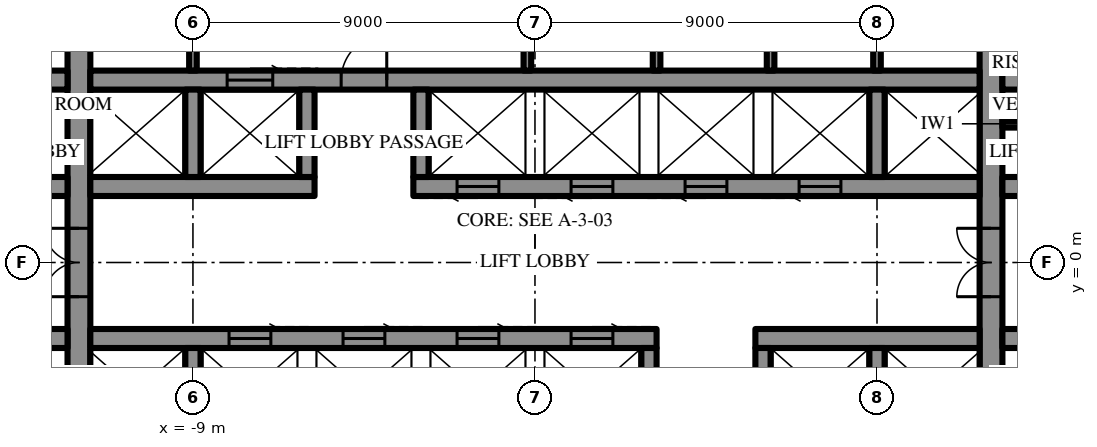
"""IFC4 building model, lengths in metres.
Left out: names, types, materials, properties, quantities, classifications, styles, units other than length and angle.
Written with IfcOpenShell. Run it as: python <this file> out.ifc"""

import sys

from ifc_helpers import new_model, si_unit, direction, frame, frame_2d, origin, place, context, subcontext, project, spatial, rectangle, extrude, element, fill, save


model = new_model("IFC4")
c1 = context("Model", 3, precision=1e-05, world=origin(), true_north=direction((0.0, 1.0)))
c2 = subcontext(c1, "Body", "Model", "MODEL_VIEW")
j1 = project(units=[si_unit("LENGTHUNIT", "METRE"), si_unit("PLANEANGLEUNIT", "RADIAN")], contexts=[c1])
p1 = place(None, origin())
s1 = spatial("IfcSite", under=j1, at=p1, CompositionType="ELEMENT")
p2 = place(p1, origin())
s2 = spatial("IfcBuilding", under=s1, at=p2, CompositionType="ELEMENT")
p3 = place(p2, frame((0.0, 0.0, 223.9)))
s3 = spatial("IfcBuildingStorey", under=s2, at=p3, CompositionType="ELEMENT", Elevation=223.9)
p4 = place(p3, frame((12.0, -10.7, 0.0), z_axis=(0.0, 0.0, 1.0), x_axis=(0.0, 1.0, 0.0)))
e1 = element("IfcWall", 1, at=p4, inside=s3, PredefinedType="SHEAR", context=c2, shape_type="SweptSolid", body=[
    extrude(rectangle(XDim=21.4, YDim=0.6, at=frame_2d((10.7, 0.0))), origin(), (0.0, 0.0, 1.0), 4.2),
])
p5 = place(p4, frame((9.8, 0.0, 0.0)))
e2 = element("IfcOpeningElement", 2, at=p5, cuts=e1, PredefinedType="OPENING", context=c2, shape_type="SweptSolid", body=[
    extrude(rectangle(XDim=1.8, YDim=2.4, at=frame_2d((0.9, 1.2))), frame((0.0, 0.31, 0.0), z_axis=(0.0, -1.0, 0.0), x_axis=(1.0, 0.0, 0.0)), (0.0, 0.0, 1.0), 0.62),
])
p6 = place(p3, frame((-12.0, -10.7, 0.0), z_axis=(0.0, 0.0, 1.0), x_axis=(0.0, 1.0, 0.0)))
e3 = element("IfcWall", 3, at=p6, inside=s3, PredefinedType="SHEAR", context=c2, shape_type="SweptSolid", body=[
    extrude(rectangle(XDim=21.4, YDim=0.6, at=frame_2d((10.7, 0.0))), origin(), (0.0, 0.0, 1.0), 4.2),
])
p7 = place(p6, frame((9.8, 0.0, 0.0)))
e4 = element("IfcOpeningElement", 4, at=p7, cuts=e3, PredefinedType="OPENING", context=c2, shape_type="SweptSolid", body=[
    extrude(rectangle(XDim=1.8, YDim=2.4, at=frame_2d((0.9, 1.2))), frame((0.0, 0.31, 0.0), z_axis=(0.0, -1.0, 0.0), x_axis=(1.0, 0.0, 0.0)), (0.0, 0.0, 1.0), 0.62),
])
p8 = place(p3, frame((-14.5, 2.0, 0.0), z_axis=(0.0, 0.0, 1.0), x_axis=(1.0, 0.0, 0.0)))
e5 = element("IfcWall", 5, at=p8, inside=s3, PredefinedType="SHEAR", context=c2, shape_type="SweptSolid", body=[
    extrude(rectangle(XDim=2.2, YDim=0.5, at=frame_2d((1.1, 0.0))), origin(), (0.0, 0.0, 1.0), 4.2),
])
p9 = place(p8, frame((0.5, 0.0, 0.0)))
e6 = element("IfcOpeningElement", 6, at=p9, cuts=e5, PredefinedType="OPENING", context=c2, shape_type="SweptSolid", body=[
    extrude(rectangle(XDim=0.9, YDim=2.2, at=frame_2d((0.45, 1.1))), frame((0.0, 0.26, 0.0), z_axis=(0.0, -1.0, 0.0), x_axis=(1.0, 0.0, 0.0)), (0.0, 0.0, 1.0), 0.52),
])
p10 = place(p3, frame((-11.7, 2.0, 0.0), z_axis=(0.0, 0.0, 1.0), x_axis=(1.0, 0.0, 0.0)))
e7 = element("IfcWall", 7, at=p10, inside=s3, PredefinedType="SHEAR", context=c2, shape_type="SweptSolid", body=[
    extrude(rectangle(XDim=5.9, YDim=0.5, at=frame_2d((2.95, 0.0))), origin(), (0.0, 0.0, 1.0), 4.2),
])
p11 = place(p3, frame((-3.2, 2.0, 0.0), z_axis=(0.0, 0.0, 1.0), x_axis=(1.0, 0.0, 0.0)))
e8 = element("IfcWall", 8, at=p11, inside=s3, PredefinedType="SHEAR", context=c2, shape_type="SweptSolid", body=[
    extrude(rectangle(XDim=14.9, YDim=0.5, at=frame_2d((7.45, 0.0))), origin(), (0.0, 0.0, 1.0), 4.2),
])
p12 = place(p11, frame((1.15, 0.0, 0.0)))
e9 = element("IfcOpeningElement", 9, at=p12, cuts=e8, PredefinedType="OPENING", context=c2, shape_type="SweptSolid", body=[
    extrude(rectangle(XDim=1.1, YDim=2.2, at=frame_2d((0.55, 1.1))), frame((0.0, 0.26, 0.0), z_axis=(0.0, -1.0, 0.0), x_axis=(1.0, 0.0, 0.0)), (0.0, 0.0, 1.0), 0.52),
])
p13 = place(p11, frame((4.15, 0.0, 0.0)))
e10 = element("IfcOpeningElement", 10, at=p13, cuts=e8, PredefinedType="OPENING", context=c2, shape_type="SweptSolid", body=[
    extrude(rectangle(XDim=1.1, YDim=2.2, at=frame_2d((0.55, 1.1))), frame((0.0, 0.26, 0.0), z_axis=(0.0, -1.0, 0.0), x_axis=(1.0, 0.0, 0.0)), (0.0, 0.0, 1.0), 0.52),
])
p14 = place(p11, frame((7.15, 0.0, 0.0)))
e11 = element("IfcOpeningElement", 11, at=p14, cuts=e8, PredefinedType="OPENING", context=c2, shape_type="SweptSolid", body=[
    extrude(rectangle(XDim=1.1, YDim=2.2, at=frame_2d((0.55, 1.1))), frame((0.0, 0.26, 0.0), z_axis=(0.0, -1.0, 0.0), x_axis=(1.0, 0.0, 0.0)), (0.0, 0.0, 1.0), 0.52),
])
p15 = place(p11, frame((10.15, 0.0, 0.0)))
e12 = element("IfcOpeningElement", 12, at=p15, cuts=e8, PredefinedType="OPENING", context=c2, shape_type="SweptSolid", body=[
    extrude(rectangle(XDim=1.1, YDim=2.2, at=frame_2d((0.55, 1.1))), frame((0.0, 0.26, 0.0), z_axis=(0.0, -1.0, 0.0), x_axis=(1.0, 0.0, 0.0)), (0.0, 0.0, 1.0), 0.52),
])
p16 = place(p3, frame((12.3, 2.0, 0.0), z_axis=(0.0, 0.0, 1.0), x_axis=(1.0, 0.0, 0.0)))
e13 = element("IfcWall", 13, at=p16, inside=s3, PredefinedType="SHEAR", context=c2, shape_type="SweptSolid", body=[
    extrude(rectangle(XDim=2.2, YDim=0.5, at=frame_2d((1.1, 0.0))), origin(), (0.0, 0.0, 1.0), 4.2),
])
p17 = place(p16, frame((0.8, 0.0, 0.0)))
e14 = element("IfcOpeningElement", 14, at=p17, cuts=e13, PredefinedType="OPENING", context=c2, shape_type="SweptSolid", body=[
    extrude(rectangle(XDim=0.9, YDim=2.2, at=frame_2d((0.45, 1.1))), frame((0.0, 0.26, 0.0), z_axis=(0.0, -1.0, 0.0), x_axis=(1.0, 0.0, 0.0)), (0.0, 0.0, 1.0), 0.52),
])
p18 = place(p3, frame((-14.5, 4.8, 0.0), z_axis=(0.0, 0.0, 1.0), x_axis=(1.0, 0.0, 0.0)))
e15 = element("IfcWall", 15, at=p18, inside=s3, PredefinedType="SHEAR", context=c2, shape_type="SweptSolid", body=[
    extrude(rectangle(XDim=2.2, YDim=0.5, at=frame_2d((1.1, 0.0))), origin(), (0.0, 0.0, 1.0), 4.2),
])
p19 = place(p3, frame((-11.7, 4.8, 0.0), z_axis=(0.0, 0.0, 1.0), x_axis=(1.0, 0.0, 0.0)))
e16 = element("IfcWall", 16, at=p19, inside=s3, PredefinedType="SHEAR", context=c2, shape_type="SweptSolid", body=[
    extrude(rectangle(XDim=23.4, YDim=0.5, at=frame_2d((11.7, 0.0))), origin(), (0.0, 0.0, 1.0), 4.2),
])
p20 = place(p19, frame((6.6, 0.0, 0.0)))
e17 = element("IfcOpeningElement", 17, at=p20, cuts=e16, PredefinedType="OPENING", context=c2, shape_type="SweptSolid", body=[
    extrude(rectangle(XDim=1.2, YDim=2.2, at=frame_2d((0.6, 1.1))), frame((0.0, 0.26, 0.0), z_axis=(0.0, -1.0, 0.0), x_axis=(1.0, 0.0, 0.0)), (0.0, 0.0, 1.0), 0.52),
])
p21 = place(p19, frame((3.6, 0.0, 0.0)))
e18 = element("IfcOpeningElement", 18, at=p21, cuts=e16, PredefinedType="OPENING", context=c2, shape_type="SweptSolid", body=[
    extrude(rectangle(XDim=1.2, YDim=2.2, at=frame_2d((0.6, 1.1))), frame((0.0, 0.26, 0.0), z_axis=(0.0, -1.0, 0.0), x_axis=(1.0, 0.0, 0.0)), (0.0, 0.0, 1.0), 0.52),
])
p22 = place(p3, frame((12.3, 4.8, 0.0), z_axis=(0.0, 0.0, 1.0), x_axis=(1.0, 0.0, 0.0)))
e19 = element("IfcWall", 19, at=p22, inside=s3, PredefinedType="SHEAR", context=c2, shape_type="SweptSolid", body=[
    extrude(rectangle(XDim=2.2, YDim=0.5, at=frame_2d((1.1, 0.0))), origin(), (0.0, 0.0, 1.0), 4.2),
])
for number, where, z_axis, x_axis in (
    (20, (-9.0, 2.25, 0.0), (0.0, 0.0, 1.0), (0.0, 1.0, 0.0)),
    (21, (-6.0, 2.25, 0.0), (0.0, 0.0, 1.0), (0.0, 1.0, 0.0)),
    (22, (-3.0, 2.25, 0.0), (0.0, 0.0, 1.0), (0.0, 1.0, 0.0)),
    (23, (9.0, 2.25, 0.0), (0.0, 0.0, 1.0), (0.0, 1.0, 0.0)),
):
    element("IfcWall", number, at=place(p3, frame(where, z_axis=z_axis, x_axis=x_axis)), inside=s3, PredefinedType="SHEAR", context=c2, shape_type="SweptSolid", body=[
        extrude(rectangle(XDim=2.3, YDim=0.4, at=frame_2d((1.15, 0.0))), origin(), (0.0, 0.0, 1.0), 4.2),
    ])
p23 = place(p3, frame((-0.2, 5.05, 0.0), z_axis=(0.0, 0.0, 1.0), x_axis=(0.0, 1.0, 0.0)))
e24 = element("IfcWall", 24, at=p23, inside=s3, PredefinedType="SHEAR", context=c2, shape_type="SweptSolid", body=[
    extrude(rectangle(XDim=5.65, YDim=0.2, at=frame_2d((2.825, 0.0))), origin(), (0.0, 0.0, 1.0), 4.2),
])
p24 = place(p3, frame((14.5, -2.0, 0.0), z_axis=(0.0, 0.0, 1.0), x_axis=(-1.0, 0.0, 0.0)))
e25 = element("IfcWall", 25, at=p24, inside=s3, PredefinedType="SHEAR", context=c2, shape_type="SweptSolid", body=[
    extrude(rectangle(XDim=2.2, YDim=0.5, at=frame_2d((1.1, 0.0))), origin(), (0.0, 0.0, 1.0), 4.2),
])
p25 = place(p24, frame((0.5, 0.0, 0.0)))
e26 = element("IfcOpeningElement", 26, at=p25, cuts=e25, PredefinedType="OPENING", context=c2, shape_type="SweptSolid", body=[
    extrude(rectangle(XDim=0.9, YDim=2.2, at=frame_2d((0.45, 1.1))), frame((0.0, 0.26, 0.0), z_axis=(0.0, -1.0, 0.0), x_axis=(1.0, 0.0, 0.0)), (0.0, 0.0, 1.0), 0.52),
])
p26 = place(p3, frame((11.7, -2.0, 0.0), z_axis=(0.0, 0.0, 1.0), x_axis=(-1.0, 0.0, 0.0)))
e27 = element("IfcWall", 27, at=p26, inside=s3, PredefinedType="SHEAR", context=c2, shape_type="SweptSolid", body=[
    extrude(rectangle(XDim=5.9, YDim=0.5, at=frame_2d((2.95, 0.0))), origin(), (0.0, 0.0, 1.0), 4.2),
])
p27 = place(p3, frame((3.2, -2.0, 0.0), z_axis=(0.0, 0.0, 1.0), x_axis=(-1.0, 0.0, 0.0)))
e28 = element("IfcWall", 28, at=p27, inside=s3, PredefinedType="SHEAR", context=c2, shape_type="SweptSolid", body=[
    extrude(rectangle(XDim=14.9, YDim=0.5, at=frame_2d((7.45, 0.0))), origin(), (0.0, 0.0, 1.0), 4.2),
])
p28 = place(p27, frame((1.15, 0.0, 0.0)))
e29 = element("IfcOpeningElement", 29, at=p28, cuts=e28, PredefinedType="OPENING", context=c2, shape_type="SweptSolid", body=[
    extrude(rectangle(XDim=1.1, YDim=2.2, at=frame_2d((0.55, 1.1))), frame((0.0, 0.26, 0.0), z_axis=(0.0, -1.0, 0.0), x_axis=(1.0, 0.0, 0.0)), (0.0, 0.0, 1.0), 0.52),
])
p29 = place(p27, frame((4.15, 0.0, 0.0)))
e30 = element("IfcOpeningElement", 30, at=p29, cuts=e28, PredefinedType="OPENING", context=c2, shape_type="SweptSolid", body=[
    extrude(rectangle(XDim=1.1, YDim=2.2, at=frame_2d((0.55, 1.1))), frame((0.0, 0.26, 0.0), z_axis=(0.0, -1.0, 0.0), x_axis=(1.0, 0.0, 0.0)), (0.0, 0.0, 1.0), 0.52),
])
p30 = place(p27, frame((7.15, 0.0, 0.0)))
e31 = element("IfcOpeningElement", 31, at=p30, cuts=e28, PredefinedType="OPENING", context=c2, shape_type="SweptSolid", body=[
    extrude(rectangle(XDim=1.1, YDim=2.2, at=frame_2d((0.55, 1.1))), frame((0.0, 0.26, 0.0), z_axis=(0.0, -1.0, 0.0), x_axis=(1.0, 0.0, 0.0)), (0.0, 0.0, 1.0), 0.52),
])
p31 = place(p27, frame((10.15, 0.0, 0.0)))
e32 = element("IfcOpeningElement", 32, at=p31, cuts=e28, PredefinedType="OPENING", context=c2, shape_type="SweptSolid", body=[
    extrude(rectangle(XDim=1.1, YDim=2.2, at=frame_2d((0.55, 1.1))), frame((0.0, 0.26, 0.0), z_axis=(0.0, -1.0, 0.0), x_axis=(1.0, 0.0, 0.0)), (0.0, 0.0, 1.0), 0.52),
])
p32 = place(p3, frame((-12.3, -2.0, 0.0), z_axis=(0.0, 0.0, 1.0), x_axis=(-1.0, 0.0, 0.0)))
e33 = element("IfcWall", 33, at=p32, inside=s3, PredefinedType="SHEAR", context=c2, shape_type="SweptSolid", body=[
    extrude(rectangle(XDim=2.2, YDim=0.5, at=frame_2d((1.1, 0.0))), origin(), (0.0, 0.0, 1.0), 4.2),
])
p33 = place(p32, frame((0.8, 0.0, 0.0)))
e34 = element("IfcOpeningElement", 34, at=p33, cuts=e33, PredefinedType="OPENING", context=c2, shape_type="SweptSolid", body=[
    extrude(rectangle(XDim=0.9, YDim=2.2, at=frame_2d((0.45, 1.1))), frame((0.0, 0.26, 0.0), z_axis=(0.0, -1.0, 0.0), x_axis=(1.0, 0.0, 0.0)), (0.0, 0.0, 1.0), 0.52),
])
for number, where, z_axis, x_axis in (
    (35, (9.0, -2.25, 0.0), (0.0, 0.0, 1.0), (0.0, -1.0, 0.0)),
    (36, (6.0, -2.25, 0.0), (0.0, 0.0, 1.0), (0.0, -1.0, 0.0)),
    (37, (3.0, -2.25, 0.0), (0.0, 0.0, 1.0), (0.0, -1.0, 0.0)),
    (38, (-9.0, -2.25, 0.0), (0.0, 0.0, 1.0), (0.0, -1.0, 0.0)),
):
    element("IfcWall", number, at=place(p3, frame(where, z_axis=z_axis, x_axis=x_axis)), inside=s3, PredefinedType="SHEAR", context=c2, shape_type="SweptSolid", body=[
        extrude(rectangle(XDim=2.3, YDim=0.4, at=frame_2d((1.15, 0.0))), origin(), (0.0, 0.0, 1.0), 4.2),
    ])
for number, where, z_axis, x_axis in (
    (39, (-9.0, 5.05, 0.0), (0.0, 0.0, 1.0), (0.0, 1.0, 0.0)),
    (40, (9.0, 5.05, 0.0), (0.0, 0.0, 1.0), (0.0, 1.0, 0.0)),
    (41, (3.2, 5.05, 0.0), (0.0, 0.0, 1.0), (0.0, 1.0, 0.0)),
    (42, (6.2, 5.05, 0.0), (0.0, 0.0, 1.0), (0.0, 1.0, 0.0)),
):
    element("IfcWall", number, at=place(p3, frame(where, z_axis=z_axis, x_axis=x_axis)), inside=s3, PredefinedType="PARTITIONING", context=c2, shape_type="SweptSolid", body=[
        extrude(rectangle(XDim=5.65, YDim=0.2, at=frame_2d((2.825, 0.0))), origin(), (0.0, 0.0, 1.0), 4.0),
    ])
p34 = place(p3, frame((12.3, 3.65, 0.0), z_axis=(0.0, 0.0, 1.0), x_axis=(1.0, 0.0, 0.0)))
e43 = element("IfcWall", 43, at=p34, inside=s3, PredefinedType="PARTITIONING", context=c2, shape_type="SweptSolid", body=[
    extrude(rectangle(XDim=1.0, YDim=0.2, at=frame_2d((0.5, 0.0))), origin(), (0.0, 0.0, 1.0), 4.0),
])
p35 = place(p20, origin())
e44 = element("IfcDoor", 44, at=p35, inside=s3, OperationType="SINGLE_SWING_LEFT", PredefinedType="DOOR", context=c2, shape_type="SweptSolid", body=[
    extrude(rectangle(XDim=1.2, YDim=2.2, at=frame_2d((0.6, 1.1))), frame((0.0, 0.025, 0.0), z_axis=(0.0, -1.0, 0.0), x_axis=(1.0, 0.0, 0.0)), (0.0, 0.0, 1.0), 0.05),
])
fill(e17, e44)
p36 = place(p5, origin())
e45 = element("IfcDoor", 45, at=p36, inside=s3, OperationType="DOUBLE_DOOR_SINGLE_SWING", PredefinedType="DOOR", context=c2, shape_type="SweptSolid", body=[
    extrude(rectangle(XDim=1.8, YDim=2.4, at=frame_2d((0.9, 1.2))), frame((0.0, 0.025, 0.0), z_axis=(0.0, -1.0, 0.0), x_axis=(1.0, 0.0, 0.0)), (0.0, 0.0, 1.0), 0.05),
])
fill(e2, e45)
p37 = place(p7, origin())
e46 = element("IfcDoor", 46, at=p37, inside=s3, OperationType="DOUBLE_DOOR_SINGLE_SWING", PredefinedType="DOOR", context=c2, shape_type="SweptSolid", body=[
    extrude(rectangle(XDim=1.8, YDim=2.4, at=frame_2d((0.9, 1.2))), frame((0.0, 0.025, 0.0), z_axis=(0.0, -1.0, 0.0), x_axis=(1.0, 0.0, 0.0)), (0.0, 0.0, 1.0), 0.05),
])
fill(e4, e46)
p38 = place(p21, origin())
e47 = element("IfcDoor", 47, at=p38, inside=s3, OperationType="SLIDING_TO_LEFT", PredefinedType="DOOR", context=c2, shape_type="SweptSolid", body=[
    extrude(rectangle(XDim=1.2, YDim=2.2, at=frame_2d((0.6, 1.1))), frame((0.0, 0.025, 0.0), z_axis=(0.0, -1.0, 0.0), x_axis=(1.0, 0.0, 0.0)), (0.0, 0.0, 1.0), 0.05),
])
fill(e18, e47)
p39 = place(p12, frame((1.1, 0.0, 0.0), z_axis=(0.0, 0.0, 1.0), x_axis=(-1.0, 0.0, 0.0)))
e48 = element("IfcDoor", 48, at=p39, inside=s3, OperationType="SLIDING_TO_LEFT", PredefinedType="DOOR", context=c2, shape_type="SweptSolid", body=[
    extrude(rectangle(XDim=1.1, YDim=2.2, at=frame_2d((0.55, 1.1))), frame((0.0, 0.025, 0.0), z_axis=(0.0, -1.0, 0.0), x_axis=(1.0, 0.0, 0.0)), (0.0, 0.0, 1.0), 0.05),
])
fill(e9, e48)
p40 = place(p13, frame((1.1, 0.0, 0.0), z_axis=(0.0, 0.0, 1.0), x_axis=(-1.0, 0.0, 0.0)))
e49 = element("IfcDoor", 49, at=p40, inside=s3, OperationType="SLIDING_TO_LEFT", PredefinedType="DOOR", context=c2, shape_type="SweptSolid", body=[
    extrude(rectangle(XDim=1.1, YDim=2.2, at=frame_2d((0.55, 1.1))), frame((0.0, 0.025, 0.0), z_axis=(0.0, -1.0, 0.0), x_axis=(1.0, 0.0, 0.0)), (0.0, 0.0, 1.0), 0.05),
])
fill(e10, e49)
p41 = place(p14, frame((1.1, 0.0, 0.0), z_axis=(0.0, 0.0, 1.0), x_axis=(-1.0, 0.0, 0.0)))
e50 = element("IfcDoor", 50, at=p41, inside=s3, OperationType="SLIDING_TO_LEFT", PredefinedType="DOOR", context=c2, shape_type="SweptSolid", body=[
    extrude(rectangle(XDim=1.1, YDim=2.2, at=frame_2d((0.55, 1.1))), frame((0.0, 0.025, 0.0), z_axis=(0.0, -1.0, 0.0), x_axis=(1.0, 0.0, 0.0)), (0.0, 0.0, 1.0), 0.05),
])
fill(e11, e50)
p42 = place(p15, frame((1.1, 0.0, 0.0), z_axis=(0.0, 0.0, 1.0), x_axis=(-1.0, 0.0, 0.0)))
e51 = element("IfcDoor", 51, at=p42, inside=s3, OperationType="SLIDING_TO_LEFT", PredefinedType="DOOR", context=c2, shape_type="SweptSolid", body=[
    extrude(rectangle(XDim=1.1, YDim=2.2, at=frame_2d((0.55, 1.1))), frame((0.0, 0.025, 0.0), z_axis=(0.0, -1.0, 0.0), x_axis=(1.0, 0.0, 0.0)), (0.0, 0.0, 1.0), 0.05),
])
fill(e12, e51)
p43 = place(p28, frame((1.1, 0.0, 0.0), z_axis=(0.0, 0.0, 1.0), x_axis=(-1.0, 0.0, 0.0)))
e52 = element("IfcDoor", 52, at=p43, inside=s3, OperationType="SLIDING_TO_LEFT", PredefinedType="DOOR", context=c2, shape_type="SweptSolid", body=[
    extrude(rectangle(XDim=1.1, YDim=2.2, at=frame_2d((0.55, 1.1))), frame((0.0, 0.025, 0.0), z_axis=(0.0, -1.0, 0.0), x_axis=(1.0, 0.0, 0.0)), (0.0, 0.0, 1.0), 0.05),
])
fill(e29, e52)
p44 = place(p29, frame((1.1, 0.0, 0.0), z_axis=(0.0, 0.0, 1.0), x_axis=(-1.0, 0.0, 0.0)))
e53 = element("IfcDoor", 53, at=p44, inside=s3, OperationType="SLIDING_TO_LEFT", PredefinedType="DOOR", context=c2, shape_type="SweptSolid", body=[
    extrude(rectangle(XDim=1.1, YDim=2.2, at=frame_2d((0.55, 1.1))), frame((0.0, 0.025, 0.0), z_axis=(0.0, -1.0, 0.0), x_axis=(1.0, 0.0, 0.0)), (0.0, 0.0, 1.0), 0.05),
])
fill(e30, e53)
p45 = place(p30, frame((1.1, 0.0, 0.0), z_axis=(0.0, 0.0, 1.0), x_axis=(-1.0, 0.0, 0.0)))
e54 = element("IfcDoor", 54, at=p45, inside=s3, OperationType="SLIDING_TO_LEFT", PredefinedType="DOOR", context=c2, shape_type="SweptSolid", body=[
    extrude(rectangle(XDim=1.1, YDim=2.2, at=frame_2d((0.55, 1.1))), frame((0.0, 0.025, 0.0), z_axis=(0.0, -1.0, 0.0), x_axis=(1.0, 0.0, 0.0)), (0.0, 0.0, 1.0), 0.05),
])
fill(e31, e54)
p46 = place(p31, frame((1.1, 0.0, 0.0), z_axis=(0.0, 0.0, 1.0), x_axis=(-1.0, 0.0, 0.0)))
e55 = element("IfcDoor", 55, at=p46, inside=s3, OperationType="SLIDING_TO_LEFT", PredefinedType="DOOR", context=c2, shape_type="SweptSolid", body=[
    extrude(rectangle(XDim=1.1, YDim=2.2, at=frame_2d((0.55, 1.1))), frame((0.0, 0.025, 0.0), z_axis=(0.0, -1.0, 0.0), x_axis=(1.0, 0.0, 0.0)), (0.0, 0.0, 1.0), 0.05),
])
fill(e32, e55)
save(model, sys.argv[1])
